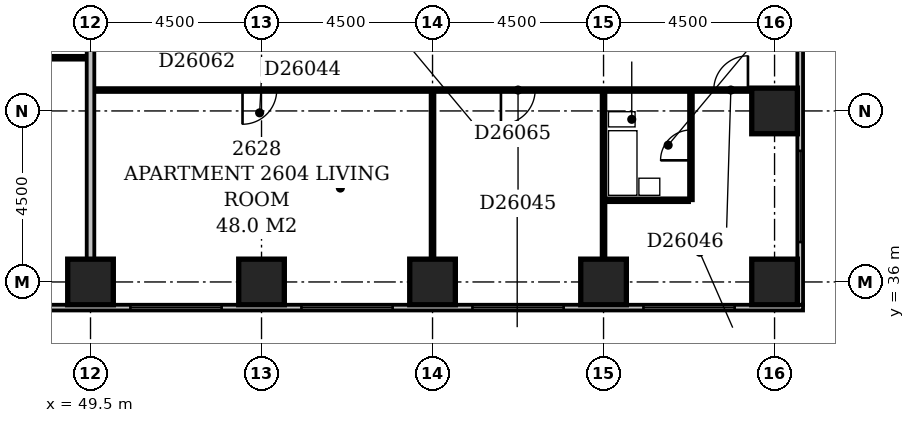
"""IFC4 building model, lengths in metres.
Left out: names, types, materials, properties, quantities, classifications, styles, units other than length and angle.
Written with IfcOpenShell. Run it as: python <this file> out.ifc"""

import sys

from ifc_helpers import new_model, si_unit, direction, frame, frame_2d, origin, origin_2d, place, context, subcontext, project, spatial, rectangle, extrude, element, fill, save


model = new_model("IFC4")
c1 = context("Model", 3, precision=1e-05, world=origin(), true_north=direction((0.0, 1.0)))
c2 = subcontext(c1, "Body", "Model", "MODEL_VIEW")
j1 = project(units=[si_unit("LENGTHUNIT", "METRE"), si_unit("PLANEANGLEUNIT", "RADIAN")], contexts=[c1])
p1 = place(None, origin())
s1 = spatial("IfcSite", under=j1, at=p1, CompositionType="ELEMENT")
p2 = place(p1, origin())
s2 = spatial("IfcBuilding", under=s1, at=p2, CompositionType="ELEMENT")
p3 = place(p2, frame((0.0, 0.0, 104.6)))
s3 = spatial("IfcBuildingStorey", under=s2, at=p3, CompositionType="ELEMENT", Elevation=104.6)
for number, where, z_axis, x_axis in (
    (1, (49.5, 36.0, -0.3), (0.0, 0.0, 1.0), (1.0, 0.0, 0.0)),
    (2, (54.0, 36.0, -0.3), (0.0, 0.0, 1.0), (1.0, 0.0, 0.0)),
    (3, (58.5, 36.0, -0.3), (0.0, 0.0, 1.0), (1.0, 0.0, 0.0)),
    (4, (63.0, 36.0, -0.3), (0.0, 0.0, 1.0), (1.0, 0.0, 0.0)),
    (5, (67.5, 36.0, -0.3), (0.0, 0.0, 1.0), (1.0, 0.0, 0.0)),
    (6, (67.5, 40.5, -0.3), (0.0, 0.0, 1.0), (1.0, 0.0, 0.0)),
):
    element("IfcColumn", number, at=place(p3, frame(where, z_axis=z_axis, x_axis=x_axis)), inside=s3, PredefinedType="COLUMN", context=c2, shape_type="SweptSolid", body=[
        extrude(rectangle(XDim=1.2, YDim=1.2, at=origin_2d()), origin(), (0.0, 0.0, 1.0), 3.45),
    ])
p4 = place(p3, frame((23.1, 35.325, 0.0), z_axis=(0.0, 0.0, 1.0), x_axis=(1.0, 0.0, 0.0)))
e7 = element("IfcWall", 7, at=p4, inside=s3, PredefinedType="STANDARD", context=c2, shape_type="SweptSolid", body=[
    extrude(rectangle(XDim=45.15, YDim=0.15, at=frame_2d((22.575, 0.0))), origin(), (0.0, 0.0, 1.0), 2.5),
])
p5 = place(p4, frame((0.45, 0.0, 0.6)))
e8 = element("IfcOpeningElement", 8, at=p5, cuts=e7, PredefinedType="OPENING", context=c2, shape_type="SweptSolid", body=[
    extrude(rectangle(XDim=2.4, YDim=1.8, at=frame_2d((1.2, 0.9))), frame((0.0, 0.087, 0.0), z_axis=(0.0, -1.0, 0.0), x_axis=(1.0, 0.0, 0.0)), (0.0, 0.0, 1.0), 0.174),
])
p6 = place(p4, frame((4.831, 0.0, 0.6)))
e9 = element("IfcOpeningElement", 9, at=p6, cuts=e7, PredefinedType="OPENING", context=c2, shape_type="SweptSolid", body=[
    extrude(rectangle(XDim=0.9, YDim=1.8, at=frame_2d((0.45, 0.9))), frame((0.0, 0.087, 0.0), z_axis=(0.0, -1.0, 0.0), x_axis=(1.0, 0.0, 0.0)), (0.0, 0.0, 1.0), 0.174),
])
p7 = place(p4, frame((9.45, 0.0, 0.6)))
e10 = element("IfcOpeningElement", 10, at=p7, cuts=e7, PredefinedType="OPENING", context=c2, shape_type="SweptSolid", body=[
    extrude(rectangle(XDim=2.4, YDim=1.8, at=frame_2d((1.2, 0.9))), frame((0.0, 0.087, 0.0), z_axis=(0.0, -1.0, 0.0), x_axis=(1.0, 0.0, 0.0)), (0.0, 0.0, 1.0), 0.174),
])
p8 = place(p4, frame((13.95, 0.0, 0.6)))
e11 = element("IfcOpeningElement", 11, at=p8, cuts=e7, PredefinedType="OPENING", context=c2, shape_type="SweptSolid", body=[
    extrude(rectangle(XDim=2.4, YDim=1.8, at=frame_2d((1.2, 0.9))), frame((0.0, 0.087, 0.0), z_axis=(0.0, -1.0, 0.0), x_axis=(1.0, 0.0, 0.0)), (0.0, 0.0, 1.0), 0.174),
])
p9 = place(p4, frame((18.234, 0.0, 0.6)))
e12 = element("IfcOpeningElement", 12, at=p9, cuts=e7, PredefinedType="OPENING", context=c2, shape_type="SweptSolid", body=[
    extrude(rectangle(XDim=0.6, YDim=1.8, at=frame_2d((0.3, 0.9))), frame((0.0, 0.087, 0.0), z_axis=(0.0, -1.0, 0.0), x_axis=(1.0, 0.0, 0.0)), (0.0, 0.0, 1.0), 0.174),
])
p10 = place(p4, frame((20.492, 0.0, 0.6)))
e13 = element("IfcOpeningElement", 13, at=p10, cuts=e7, PredefinedType="OPENING", context=c2, shape_type="SweptSolid", body=[
    extrude(rectangle(XDim=0.6, YDim=1.8, at=frame_2d((0.3, 0.9))), frame((0.0, 0.087, 0.0), z_axis=(0.0, -1.0, 0.0), x_axis=(1.0, 0.0, 0.0)), (0.0, 0.0, 1.0), 0.174),
])
p11 = place(p4, frame((22.95, 0.0, 0.6)))
e14 = element("IfcOpeningElement", 14, at=p11, cuts=e7, PredefinedType="OPENING", context=c2, shape_type="SweptSolid", body=[
    extrude(rectangle(XDim=2.4, YDim=1.8, at=frame_2d((1.2, 0.9))), frame((0.0, 0.087, 0.0), z_axis=(0.0, -1.0, 0.0), x_axis=(1.0, 0.0, 0.0)), (0.0, 0.0, 1.0), 0.174),
])
p12 = place(p4, frame((27.45, 0.0, 0.6)))
e15 = element("IfcOpeningElement", 15, at=p12, cuts=e7, PredefinedType="OPENING", context=c2, shape_type="SweptSolid", body=[
    extrude(rectangle(XDim=2.4, YDim=1.8, at=frame_2d((1.2, 0.9))), frame((0.0, 0.087, 0.0), z_axis=(0.0, -1.0, 0.0), x_axis=(1.0, 0.0, 0.0)), (0.0, 0.0, 1.0), 0.174),
])
p13 = place(p4, frame((31.95, 0.0, 0.6)))
e16 = element("IfcOpeningElement", 16, at=p13, cuts=e7, PredefinedType="OPENING", context=c2, shape_type="SweptSolid", body=[
    extrude(rectangle(XDim=2.4, YDim=1.8, at=frame_2d((1.2, 0.9))), frame((0.0, 0.087, 0.0), z_axis=(0.0, -1.0, 0.0), x_axis=(1.0, 0.0, 0.0)), (0.0, 0.0, 1.0), 0.174),
])
p14 = place(p4, frame((36.45, 0.0, 0.6)))
e17 = element("IfcOpeningElement", 17, at=p14, cuts=e7, PredefinedType="OPENING", context=c2, shape_type="SweptSolid", body=[
    extrude(rectangle(XDim=2.4, YDim=1.8, at=frame_2d((1.2, 0.9))), frame((0.0, 0.087, 0.0), z_axis=(0.0, -1.0, 0.0), x_axis=(1.0, 0.0, 0.0)), (0.0, 0.0, 1.0), 0.174),
])
p15 = place(p4, frame((40.95, 0.0, 0.6)))
e18 = element("IfcOpeningElement", 18, at=p15, cuts=e7, PredefinedType="OPENING", context=c2, shape_type="SweptSolid", body=[
    extrude(rectangle(XDim=2.4, YDim=1.8, at=frame_2d((1.2, 0.9))), frame((0.0, 0.087, 0.0), z_axis=(0.0, -1.0, 0.0), x_axis=(1.0, 0.0, 0.0)), (0.0, 0.0, 1.0), 0.174),
])
p16 = place(p3, frame((68.175, 35.4, 0.0), z_axis=(0.0, 0.0, 1.0), x_axis=(0.0, 1.0, 0.0)))
e19 = element("IfcWall", 19, at=p16, inside=s3, PredefinedType="STANDARD", context=c2, shape_type="SweptSolid", body=[
    extrude(rectangle(XDim=23.85, YDim=0.15, at=frame_2d((11.925, 0.0))), origin(), (0.0, 0.0, 1.0), 2.5),
])
p17 = place(p16, frame((1.65, 0.0, 0.6)))
e20 = element("IfcOpeningElement", 20, at=p17, cuts=e19, PredefinedType="OPENING", context=c2, shape_type="SweptSolid", body=[
    extrude(rectangle(XDim=2.4, YDim=1.8, at=frame_2d((1.2, 0.9))), frame((0.0, 0.087, 0.0), z_axis=(0.0, -1.0, 0.0), x_axis=(1.0, 0.0, 0.0)), (0.0, 0.0, 1.0), 0.174),
])
p18 = place(p16, frame((10.65, 0.0, 0.6)))
e21 = element("IfcOpeningElement", 21, at=p18, cuts=e19, PredefinedType="OPENING", context=c2, shape_type="SweptSolid", body=[
    extrude(rectangle(XDim=2.4, YDim=1.8, at=frame_2d((1.2, 0.9))), frame((0.0, 0.087, 0.0), z_axis=(0.0, -1.0, 0.0), x_axis=(1.0, 0.0, 0.0)), (0.0, 0.0, 1.0), 0.174),
])
p19 = place(p16, frame((19.65, 0.0, 0.6)))
e22 = element("IfcOpeningElement", 22, at=p19, cuts=e19, PredefinedType="OPENING", context=c2, shape_type="SweptSolid", body=[
    extrude(rectangle(XDim=2.4, YDim=1.8, at=frame_2d((1.2, 0.9))), frame((0.0, 0.087, 0.0), z_axis=(0.0, -1.0, 0.0), x_axis=(1.0, 0.0, 0.0)), (0.0, 0.0, 1.0), 0.174),
])
p20 = place(p3, frame((49.5, 36.6, 0.0), z_axis=(0.0, 0.0, 1.0), x_axis=(0.0, 1.0, 0.0)))
e23 = element("IfcWall", 23, at=p20, inside=s3, PredefinedType="PARTITIONING", context=c2, shape_type="SweptSolid", body=[
    extrude(rectangle(XDim=12.8, YDim=0.2, at=frame_2d((6.4, 0.0))), origin(), (0.0, 0.0, 1.0), 3.15),
])
p21 = place(p3, frame((58.5, 36.6, 0.0), z_axis=(0.0, 0.0, 1.0), x_axis=(0.0, 1.0, 0.0)))
e24 = element("IfcWall", 24, at=p21, inside=s3, PredefinedType="PARTITIONING", context=c2, shape_type="SweptSolid", body=[
    extrude(rectangle(XDim=4.4, YDim=0.1, at=frame_2d((2.2, 0.0))), origin(), (0.0, 0.0, 1.0), 3.15),
])
p22 = place(p3, frame((63.0, 36.6, 0.0), z_axis=(0.0, 0.0, 1.0), x_axis=(0.0, 1.0, 0.0)))
e25 = element("IfcWall", 25, at=p22, inside=s3, PredefinedType="PARTITIONING", context=c2, shape_type="SweptSolid", body=[
    extrude(rectangle(XDim=4.4, YDim=0.1, at=frame_2d((2.2, 0.0))), origin(), (0.0, 0.0, 1.0), 2.25),
])
p23 = place(p3, frame((63.05, 38.15, 0.0), z_axis=(0.0, 0.0, 1.0), x_axis=(1.0, 0.0, 0.0)))
e26 = element("IfcWall", 26, at=p23, inside=s3, PredefinedType="PLUMBINGWALL", context=c2, shape_type="SweptSolid", body=[
    extrude(rectangle(XDim=2.2, YDim=0.1, at=frame_2d((1.1, 0.0))), origin(), (0.0, 0.0, 1.0), 3.15),
])
p24 = place(p3, frame((65.3, 38.15, 0.0), z_axis=(0.0, 0.0, 1.0), x_axis=(0.0, 1.0, 0.0)))
e27 = element("IfcWall", 27, at=p24, inside=s3, PredefinedType="PLUMBINGWALL", context=c2, shape_type="SweptSolid", body=[
    extrude(rectangle(XDim=2.85, YDim=0.1, at=frame_2d((1.425, 0.0))), origin(), (0.0, 0.0, 1.0), 3.15),
])
p25 = place(p24, frame((1.05, 0.0, 0.0)))
e28 = element("IfcOpeningElement", 28, at=p25, cuts=e27, PredefinedType="OPENING", context=c2, shape_type="SweptSolid", body=[
    extrude(rectangle(XDim=0.8, YDim=2.1, at=frame_2d((0.4, 1.05))), frame((0.0, 0.062, 0.0), z_axis=(0.0, -1.0, 0.0), x_axis=(1.0, 0.0, 0.0)), (0.0, 0.0, 1.0), 0.124),
])
p26 = place(p3, frame((49.6, 41.05, 0.0), z_axis=(0.0, 0.0, 1.0), x_axis=(1.0, 0.0, 0.0)))
e29 = element("IfcWall", 29, at=p26, inside=s3, PredefinedType="PARTITIONING", context=c2, shape_type="SweptSolid", body=[
    extrude(rectangle(XDim=17.3, YDim=0.1, at=frame_2d((8.65, 0.0))), origin(), (0.0, 0.0, 1.0), 3.15),
])
p27 = place(p26, frame((3.9, 0.0, 0.0)))
e30 = element("IfcOpeningElement", 30, at=p27, cuts=e29, PredefinedType="OPENING", context=c2, shape_type="SweptSolid", body=[
    extrude(rectangle(XDim=0.9, YDim=2.1, at=frame_2d((0.45, 1.05))), frame((0.0, 0.062, 0.0), z_axis=(0.0, -1.0, 0.0), x_axis=(1.0, 0.0, 0.0)), (0.0, 0.0, 1.0), 0.124),
])
p28 = place(p26, frame((10.7, 0.0, 0.0)))
e31 = element("IfcOpeningElement", 31, at=p28, cuts=e29, PredefinedType="OPENING", context=c2, shape_type="SweptSolid", body=[
    extrude(rectangle(XDim=0.9, YDim=2.1, at=frame_2d((0.45, 1.05))), frame((0.0, 0.062, 0.0), z_axis=(0.0, -1.0, 0.0), x_axis=(1.0, 0.0, 0.0)), (0.0, 0.0, 1.0), 0.124),
])
p29 = place(p26, frame((16.3, 0.0, 0.0)))
e32 = element("IfcOpeningElement", 32, at=p29, cuts=e29, PredefinedType="OPENING", context=c2, shape_type="SweptSolid", body=[
    extrude(rectangle(XDim=0.9, YDim=2.1, at=frame_2d((0.45, 1.05))), frame((0.0, 0.062, 0.0), z_axis=(0.0, -1.0, 0.0), x_axis=(1.0, 0.0, 0.0)), (0.0, 0.0, 1.0), 0.124),
])
p30 = place(p3, frame((36.1, 41.9, 0.0), z_axis=(0.0, 0.0, 1.0), x_axis=(1.0, 0.0, 0.0)))
e33 = element("IfcWall", 33, at=p30, inside=s3, PredefinedType="PARTITIONING", context=c2, shape_type="SweptSolid", body=[
    extrude(rectangle(XDim=13.3, YDim=0.1, at=frame_2d((6.65, 0.0))), origin(), (0.0, 0.0, 1.0), 3.15),
])
p31 = place(p30, frame((1.7, 0.0, 0.0)))
e34 = element("IfcOpeningElement", 34, at=p31, cuts=e33, PredefinedType="OPENING", context=c2, shape_type="SweptSolid", body=[
    extrude(rectangle(XDim=0.9, YDim=2.1, at=frame_2d((0.45, 1.05))), frame((0.0, 0.062, 0.0), z_axis=(0.0, -1.0, 0.0), x_axis=(1.0, 0.0, 0.0)), (0.0, 0.0, 1.0), 0.124),
])
p32 = place(p30, frame((7.35, 0.0, 0.0)))
e35 = element("IfcOpeningElement", 35, at=p32, cuts=e33, PredefinedType="OPENING", context=c2, shape_type="SweptSolid", body=[
    extrude(rectangle(XDim=0.9, YDim=2.1, at=frame_2d((0.45, 1.05))), frame((0.0, 0.062, 0.0), z_axis=(0.0, -1.0, 0.0), x_axis=(1.0, 0.0, 0.0)), (0.0, 0.0, 1.0), 0.124),
])
p33 = place(p30, frame((10.7, 0.0, 0.0)))
e36 = element("IfcOpeningElement", 36, at=p33, cuts=e33, PredefinedType="OPENING", context=c2, shape_type="SweptSolid", body=[
    extrude(rectangle(XDim=0.9, YDim=2.1, at=frame_2d((0.45, 1.05))), frame((0.0, 0.062, 0.0), z_axis=(0.0, -1.0, 0.0), x_axis=(1.0, 0.0, 0.0)), (0.0, 0.0, 1.0), 0.124),
])
p34 = place(p12, origin())
e37 = element("IfcWindow", 37, at=p34, inside=s3, PartitioningType="SINGLE_PANEL", PredefinedType="WINDOW", context=c2, shape_type="SweptSolid", body=[
    extrude(rectangle(XDim=2.4, YDim=1.8, at=frame_2d((1.2, 0.9))), frame((0.0, 0.03, 0.0), z_axis=(0.0, -1.0, 0.0), x_axis=(1.0, 0.0, 0.0)), (0.0, 0.0, 1.0), 0.06),
])
fill(e15, e37)
p35 = place(p13, origin())
e38 = element("IfcWindow", 38, at=p35, inside=s3, PartitioningType="SINGLE_PANEL", PredefinedType="WINDOW", context=c2, shape_type="SweptSolid", body=[
    extrude(rectangle(XDim=2.4, YDim=1.8, at=frame_2d((1.2, 0.9))), frame((0.0, 0.03, 0.0), z_axis=(0.0, -1.0, 0.0), x_axis=(1.0, 0.0, 0.0)), (0.0, 0.0, 1.0), 0.06),
])
fill(e16, e38)
p36 = place(p14, origin())
e39 = element("IfcWindow", 39, at=p36, inside=s3, PartitioningType="SINGLE_PANEL", PredefinedType="WINDOW", context=c2, shape_type="SweptSolid", body=[
    extrude(rectangle(XDim=2.4, YDim=1.8, at=frame_2d((1.2, 0.9))), frame((0.0, 0.03, 0.0), z_axis=(0.0, -1.0, 0.0), x_axis=(1.0, 0.0, 0.0)), (0.0, 0.0, 1.0), 0.06),
])
fill(e17, e39)
p37 = place(p15, origin())
e40 = element("IfcWindow", 40, at=p37, inside=s3, PartitioningType="SINGLE_PANEL", PredefinedType="WINDOW", context=c2, shape_type="SweptSolid", body=[
    extrude(rectangle(XDim=2.4, YDim=1.8, at=frame_2d((1.2, 0.9))), frame((0.0, 0.03, 0.0), z_axis=(0.0, -1.0, 0.0), x_axis=(1.0, 0.0, 0.0)), (0.0, 0.0, 1.0), 0.06),
])
fill(e18, e40)
p38 = place(p17, origin())
e41 = element("IfcWindow", 41, at=p38, inside=s3, PartitioningType="SINGLE_PANEL", PredefinedType="WINDOW", context=c2, shape_type="SweptSolid", body=[
    extrude(rectangle(XDim=2.4, YDim=1.8, at=frame_2d((1.2, 0.9))), frame((0.0, 0.03, 0.0), z_axis=(0.0, -1.0, 0.0), x_axis=(1.0, 0.0, 0.0)), (0.0, 0.0, 1.0), 0.06),
])
fill(e20, e41)
p39 = place(p25, origin())
e42 = element("IfcDoor", 42, at=p39, inside=s3, OperationType="SINGLE_SWING_LEFT", PredefinedType="DOOR", context=c2, shape_type="SweptSolid", body=[
    extrude(rectangle(XDim=0.8, YDim=2.1, at=frame_2d((0.4, 1.05))), frame((0.0, 0.025, 0.0), z_axis=(0.0, -1.0, 0.0), x_axis=(1.0, 0.0, 0.0)), (0.0, 0.0, 1.0), 0.05),
])
fill(e28, e42)
p40 = place(p27, frame((0.9, 0.0, 0.0), z_axis=(0.0, 0.0, 1.0), x_axis=(-1.0, 0.0, 0.0)))
e43 = element("IfcDoor", 43, at=p40, inside=s3, OperationType="SINGLE_SWING_RIGHT", PredefinedType="DOOR", context=c2, shape_type="SweptSolid", body=[
    extrude(rectangle(XDim=0.9, YDim=2.1, at=frame_2d((0.45, 1.05))), frame((0.0, 0.025, 0.0), z_axis=(0.0, -1.0, 0.0), x_axis=(1.0, 0.0, 0.0)), (0.0, 0.0, 1.0), 0.05),
])
fill(e30, e43)
p41 = place(p28, frame((0.9, 0.0, 0.0), z_axis=(0.0, 0.0, 1.0), x_axis=(-1.0, 0.0, 0.0)))
e44 = element("IfcDoor", 44, at=p41, inside=s3, OperationType="SINGLE_SWING_RIGHT", PredefinedType="DOOR", context=c2, shape_type="SweptSolid", body=[
    extrude(rectangle(XDim=0.9, YDim=2.1, at=frame_2d((0.45, 1.05))), frame((0.0, 0.025, 0.0), z_axis=(0.0, -1.0, 0.0), x_axis=(1.0, 0.0, 0.0)), (0.0, 0.0, 1.0), 0.05),
])
fill(e31, e44)
p42 = place(p29, frame((0.9, 0.0, 0.0), z_axis=(0.0, 0.0, 1.0), x_axis=(-1.0, 0.0, 0.0)))
e45 = element("IfcDoor", 45, at=p42, inside=s3, OperationType="SINGLE_SWING_LEFT", PredefinedType="DOOR", context=c2, shape_type="SweptSolid", body=[
    extrude(rectangle(XDim=0.9, YDim=2.1, at=frame_2d((0.45, 1.05))), frame((0.0, 0.025, 0.0), z_axis=(0.0, -1.0, 0.0), x_axis=(1.0, 0.0, 0.0)), (0.0, 0.0, 1.0), 0.05),
])
fill(e32, e45)
save(model, sys.argv[1])
